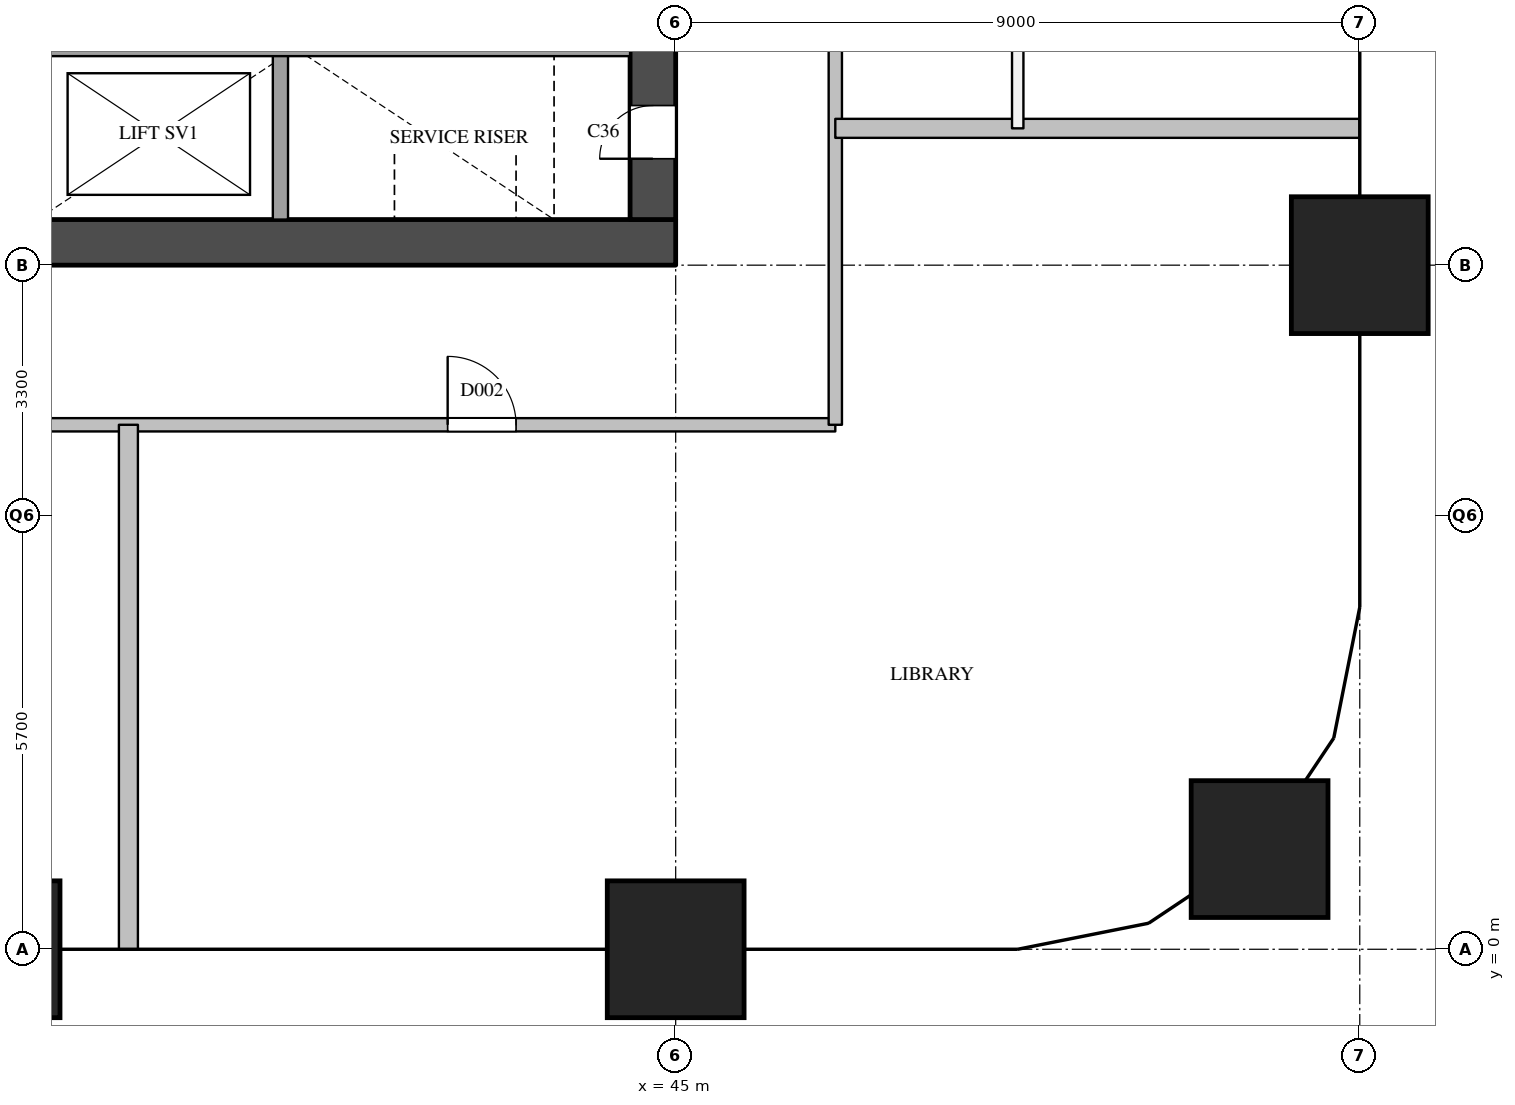
"""IFC4 building model, lengths in metres.
Left out: names, types, materials, properties, quantities, classifications, styles, units other than length and angle.
Written with IfcOpenShell. Run it as: python <this file> out.ifc"""

import sys

from ifc_helpers import new_model, si_unit, direction, frame, frame_2d, origin, origin_2d, place, context, subcontext, project, spatial, rectangle, extrude, element, fill, save


model = new_model("IFC4")
c1 = context("Model", 3, precision=1e-05, world=origin(), true_north=direction((0.0, 1.0)))
c2 = subcontext(c1, "Body", "Model", "MODEL_VIEW")
j1 = project(units=[si_unit("LENGTHUNIT", "METRE"), si_unit("PLANEANGLEUNIT", "RADIAN")], contexts=[c1])
p1 = place(None, origin())
s1 = spatial("IfcSite", under=j1, at=p1, CompositionType="ELEMENT")
p2 = place(p1, origin())
s2 = spatial("IfcBuilding", under=s1, at=p2, CompositionType="ELEMENT")
p3 = place(p2, frame((0.0, 0.0, 61.4)))
s3 = spatial("IfcBuildingStorey", under=s2, at=p3, CompositionType="ELEMENT", Elevation=61.4)
for number, where, z_axis, x_axis in (
    (1, (36.0, 0.0, 0.0), (0.0, 0.0, 1.0), (1.0, 0.0, 0.0)),
    (2, (45.0, 0.0, 0.0), (0.0, 0.0, 1.0), (1.0, 0.0, 0.0)),
    (3, (52.682, 1.318, 0.0), (0.0, 0.0, 1.0), (1.0, 0.0, 0.0)),
    (4, (54.0, 9.0, 0.0), (0.0, 0.0, 1.0), (1.0, 0.0, 0.0)),
):
    element("IfcColumn", number, at=place(p3, frame(where, z_axis=z_axis, x_axis=x_axis)), inside=s3, PredefinedType="COLUMN", context=c2, shape_type="SweptSolid", body=[
        extrude(rectangle(XDim=1.8, YDim=1.8, at=origin_2d()), origin(), (0.0, 0.0, 1.0), 3.8),
    ])
p4 = place(p3, frame((36.0, 9.3, 0.0), z_axis=(0.0, 0.0, 1.0), x_axis=(1.0, 0.0, 0.0)))
e5 = element("IfcWall", 5, at=p4, inside=s3, PredefinedType="SHEAR", context=c2, shape_type="SweptSolid", body=[
    extrude(rectangle(XDim=9.0, YDim=0.6, at=frame_2d((4.5, 0.0))), origin(), (0.0, 0.0, 1.0), 3.5),
])
p5 = place(p3, frame((44.7, 9.6, 0.0), z_axis=(0.0, 0.0, 1.0), x_axis=(0.0, 1.0, 0.0)))
e6 = element("IfcWall", 6, at=p5, inside=s3, PredefinedType="SHEAR", context=c2, shape_type="SweptSolid", body=[
    extrude(rectangle(XDim=12.3, YDim=0.6, at=frame_2d((6.15, 0.0))), origin(), (0.0, 0.0, 1.0), 3.5),
])
p6 = place(p5, frame((0.8, 0.0, 0.0)))
e7 = element("IfcOpeningElement", 7, at=p6, cuts=e6, PredefinedType="OPENING", context=c2, shape_type="SweptSolid", body=[
    extrude(rectangle(XDim=0.7, YDim=2.1, at=frame_2d((0.35, 1.05))), frame((0.0, 0.31, 0.0), z_axis=(0.0, -1.0, 0.0), x_axis=(1.0, 0.0, 0.0)), (0.0, 0.0, 1.0), 0.62),
])
p7 = place(p3, frame((39.8, 9.6, 0.0), z_axis=(0.0, 0.0, 1.0), x_axis=(0.0, 1.0, 0.0)))
e8 = element("IfcWall", 8, at=p7, inside=s3, PredefinedType="SOLIDWALL", context=c2, shape_type="SweptSolid", body=[
    extrude(rectangle(XDim=2.3, YDim=0.2, at=frame_2d((1.15, 0.0))), origin(), (0.0, 0.0, 1.0), 3.5),
])
p8 = place(p3, frame((36.6, 11.85, 0.0), z_axis=(0.0, 0.0, 1.0), x_axis=(1.0, 0.0, 0.0)))
e9 = element("IfcWall", 9, at=p8, inside=s3, PredefinedType="SOLIDWALL", context=c2, shape_type="SweptSolid", body=[
    extrude(rectangle(XDim=7.8, YDim=0.2, at=frame_2d((3.9, 0.0))), origin(), (0.0, 0.0, 1.0), 3.5),
])
p9 = place(p3, frame((33.9, 6.9, 0.0), z_axis=(0.0, 0.0, 1.0), x_axis=(1.0, 0.0, 0.0)))
e10 = element("IfcWall", 10, at=p9, inside=s3, PredefinedType="PARTITIONING", context=c2, shape_type="SweptSolid", body=[
    extrude(rectangle(XDim=13.2, YDim=0.175, at=frame_2d((6.6, 0.0))), origin(), (0.0, 0.0, 1.0), 3.5),
])
p10 = place(p9, frame((8.1, 0.0, 0.0)))
e11 = element("IfcOpeningElement", 11, at=p10, cuts=e10, PredefinedType="OPENING", context=c2, shape_type="SweptSolid", body=[
    extrude(rectangle(XDim=0.9, YDim=2.1, at=frame_2d((0.45, 1.05))), frame((0.0, 0.097, 0.0), z_axis=(0.0, -1.0, 0.0), x_axis=(1.0, 0.0, 0.0)), (0.0, 0.0, 1.0), 0.195),
])
p11 = place(p3, frame((47.1, 6.9, 0.0), z_axis=(0.0, 0.0, 1.0), x_axis=(0.0, 1.0, 0.0)))
e12 = element("IfcWall", 12, at=p11, inside=s3, PredefinedType="PARTITIONING", context=c2, shape_type="SweptSolid", body=[
    extrude(rectangle(XDim=17.09, YDim=0.175, at=frame_2d((8.545, 0.0))), origin(), (0.0, 0.0, 1.0), 3.5),
])
p12 = place(p11, frame((7.6, 0.0, 0.0)))
e13 = element("IfcOpeningElement", 13, at=p12, cuts=e12, PredefinedType="OPENING", context=c2, shape_type="SweptSolid", body=[
    extrude(rectangle(XDim=1.0, YDim=2.1, at=frame_2d((0.5, 1.05))), frame((0.0, 0.097, 0.0), z_axis=(0.0, -1.0, 0.0), x_axis=(1.0, 0.0, 0.0)), (0.0, 0.0, 1.0), 0.195),
])
p13 = place(p11, frame((15.395, 0.0, 0.0)))
e14 = element("IfcOpeningElement", 14, at=p13, cuts=e12, PredefinedType="OPENING", context=c2, shape_type="SweptSolid", body=[
    extrude(rectangle(XDim=1.0, YDim=2.1, at=frame_2d((0.5, 1.05))), frame((0.0, 0.097, 0.0), z_axis=(0.0, -1.0, 0.0), x_axis=(1.0, 0.0, 0.0)), (0.0, 0.0, 1.0), 0.195),
])
p14 = place(p3, frame((49.5, 10.8, 0.0), z_axis=(0.0, 0.0, 1.0), x_axis=(0.0, 1.0, 0.0)))
e15 = element("IfcWall", 15, at=p14, inside=s3, PredefinedType="PARTITIONING", context=c2, shape_type="SweptSolid", body=[
    extrude(rectangle(XDim=8.4, YDim=0.15, at=frame_2d((4.2, 0.0))), origin(), (0.0, 0.0, 1.0), 3.5),
])
p15 = place(p14, frame((3.75, 0.0, 0.0)))
e16 = element("IfcOpeningElement", 16, at=p15, cuts=e15, PredefinedType="OPENING", context=c2, shape_type="SweptSolid", body=[
    extrude(rectangle(XDim=0.9, YDim=2.1, at=frame_2d((0.45, 1.05))), frame((0.0, 0.085, 0.0), z_axis=(0.0, -1.0, 0.0), x_axis=(1.0, 0.0, 0.0)), (0.0, 0.0, 1.0), 0.17),
])
for number, where, z_axis, x_axis in (
    (17, (47.1, 10.8, 0.0), (0.0, 0.0, 1.0), (1.0, 0.0, 0.0)),
    (18, (37.8, 0.0, 0.0), (0.0, 0.0, 1.0), (0.0, 1.0, 0.0)),
):
    element("IfcWall", number, at=place(p3, frame(where, z_axis=z_axis, x_axis=x_axis)), inside=s3, PredefinedType="PARTITIONING", context=c2, shape_type="SweptSolid", body=[
        extrude(rectangle(XDim=6.9, YDim=0.25, at=frame_2d((3.45, 0.0))), origin(), (0.0, 0.0, 1.0), 2.5),
    ])
p16 = place(p6, origin())
e19 = element("IfcDoor", 19, at=p16, inside=s3, OperationType="SINGLE_SWING_LEFT", PredefinedType="DOOR", context=c2, shape_type="SweptSolid", body=[
    extrude(rectangle(XDim=0.7, YDim=2.1, at=frame_2d((0.35, 1.05))), frame((0.0, 0.025, 0.0), z_axis=(0.0, -1.0, 0.0), x_axis=(1.0, 0.0, 0.0)), (0.0, 0.0, 1.0), 0.05),
])
fill(e7, e19)
p17 = place(p10, origin())
e20 = element("IfcDoor", 20, at=p17, inside=s3, OperationType="SINGLE_SWING_LEFT", PredefinedType="DOOR", context=c2, shape_type="SweptSolid", body=[
    extrude(rectangle(XDim=0.9, YDim=2.1, at=frame_2d((0.45, 1.05))), frame((0.0, 0.025, 0.0), z_axis=(0.0, -1.0, 0.0), x_axis=(1.0, 0.0, 0.0)), (0.0, 0.0, 1.0), 0.05),
])
fill(e11, e20)
save(model, sys.argv[1])
